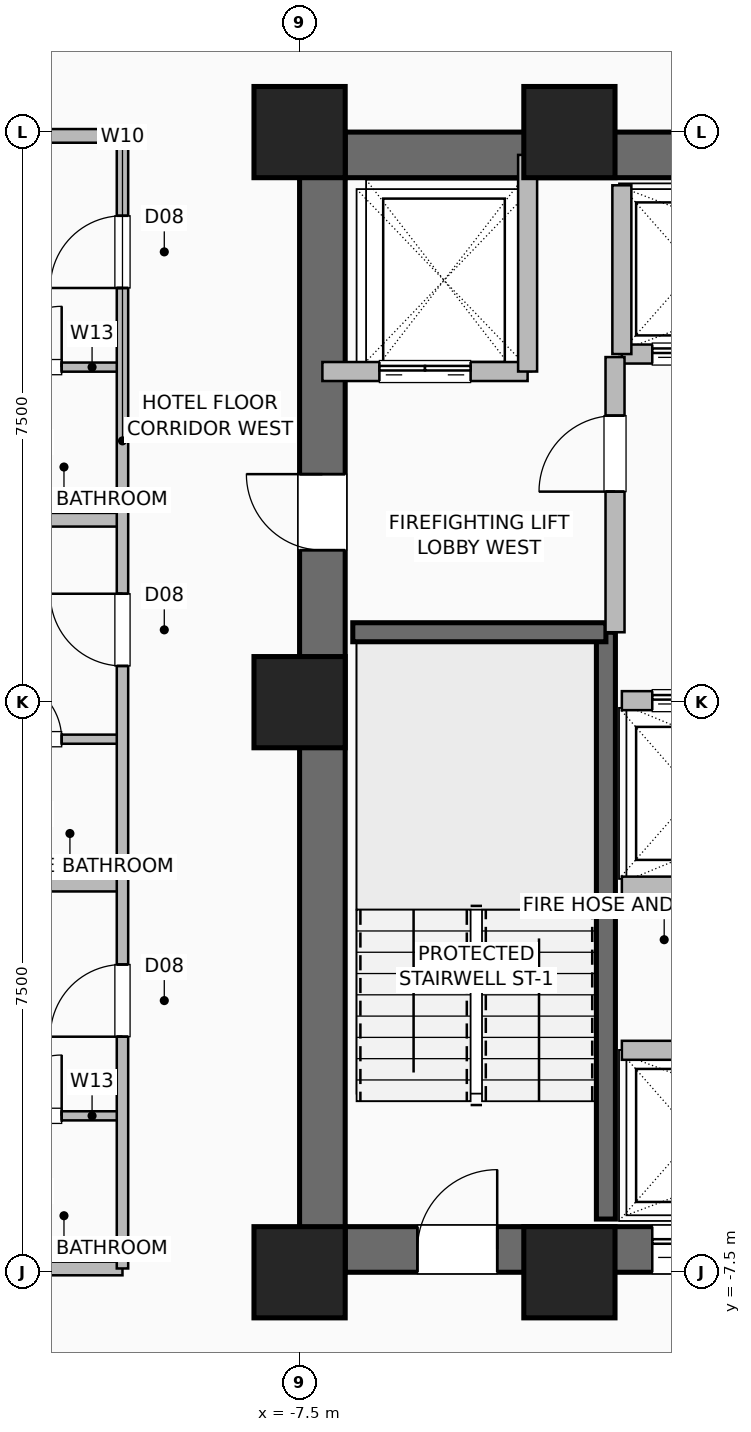
"""IFC4 building model, lengths in metres.
Left out: names, types, materials, properties, quantities, classifications, styles, units other than length and angle.
Written with IfcOpenShell. Run it as: python <this file> out.ifc"""

import sys

from ifc_helpers import new_model, si_unit, direction, frame, frame_2d, origin, origin_2d, place, context, subcontext, project, spatial, rectangle, hollow_rectangle, extrude, element, fill, save


model = new_model("IFC4")
c1 = context("Model", 3, precision=1e-05, world=origin(), true_north=direction((0.0, 1.0)))
c2 = subcontext(c1, "Body", "Model", "MODEL_VIEW")
j1 = project(units=[si_unit("LENGTHUNIT", "METRE"), si_unit("PLANEANGLEUNIT", "RADIAN")], contexts=[c1])
p1 = place(None, origin())
s1 = spatial("IfcSite", under=j1, at=p1, CompositionType="ELEMENT")
p2 = place(p1, origin())
s2 = spatial("IfcBuilding", under=s1, at=p2, CompositionType="ELEMENT")
p3 = place(p2, frame((0.0, 0.0, 55.0)))
s3 = spatial("IfcBuildingStorey", under=s2, at=p3, CompositionType="ELEMENT", Elevation=55.0)
for number, where, z_axis, x_axis in (
    (1, (-7.5, -7.5, 0.0), (0.0, 0.0, 1.0), (1.0, 0.0, 0.0)),
    (2, (-3.95, -7.5, 0.0), (0.0, 0.0, 1.0), (1.0, 0.0, 0.0)),
    (3, (-3.95, 7.5, 0.0), (0.0, 0.0, 1.0), (1.0, 0.0, 0.0)),
    (4, (-7.5, 7.5, 0.0), (0.0, 0.0, 1.0), (1.0, 0.0, 0.0)),
    (5, (-7.5, 0.0, 0.0), (0.0, 0.0, 1.0), (1.0, 0.0, 0.0)),
):
    element("IfcColumn", number, at=place(p3, frame(where, z_axis=z_axis, x_axis=x_axis)), inside=s3, PredefinedType="COLUMN", context=c2, shape_type="SweptSolid", body=[
        extrude(hollow_rectangle(XDim=1.2, YDim=1.2, WallThickness=0.055, at=origin_2d()), origin(), (0.0, 0.0, 1.0), 3.5),
    ])
p4 = place(p3, frame((-7.5, -7.2, 0.0), z_axis=(0.0, 0.0, 1.0), x_axis=(1.0, 0.0, 0.0)))
e6 = element("IfcWall", 6, at=p4, inside=s3, PredefinedType="SHEAR", context=c2, shape_type="SweptSolid", body=[
    extrude(rectangle(XDim=15.0, YDim=0.6, at=frame_2d((7.5, 0.0))), origin(), (0.0, 0.0, 1.0), 3.25),
])
p5 = place(p4, frame((1.55, 0.0, 0.0)))
e7 = element("IfcOpeningElement", 7, at=p5, cuts=e6, PredefinedType="OPENING", context=c2, shape_type="SweptSolid", body=[
    extrude(rectangle(XDim=1.05, YDim=2.08, at=frame_2d((0.525, 1.04))), frame((0.0, 0.31, 0.0), z_axis=(0.0, -1.0, 0.0), x_axis=(1.0, 0.0, 0.0)), (0.0, 0.0, 1.0), 0.62),
])
p6 = place(p4, frame((12.4, 0.0, 0.0)))
e8 = element("IfcOpeningElement", 8, at=p6, cuts=e6, PredefinedType="OPENING", context=c2, shape_type="SweptSolid", body=[
    extrude(rectangle(XDim=1.05, YDim=2.08, at=frame_2d((0.525, 1.04))), frame((0.0, 0.31, 0.0), z_axis=(0.0, -1.0, 0.0), x_axis=(1.0, 0.0, 0.0)), (0.0, 0.0, 1.0), 0.62),
])
p7 = place(p4, frame((4.64, 0.0, 0.0)))
e9 = element("IfcOpeningElement", 9, at=p7, cuts=e6, PredefinedType="OPENING", context=c2, shape_type="SweptSolid", body=[
    extrude(rectangle(XDim=1.1, YDim=2.2, at=frame_2d((0.55, 1.1))), frame((0.0, 0.31, 0.0), z_axis=(0.0, -1.0, 0.0), x_axis=(1.0, 0.0, 0.0)), (0.0, 0.0, 1.0), 0.62),
])
p8 = place(p4, frame((6.52, 0.0, 0.0)))
e10 = element("IfcOpeningElement", 10, at=p8, cuts=e6, PredefinedType="OPENING", context=c2, shape_type="SweptSolid", body=[
    extrude(rectangle(XDim=1.1, YDim=2.2, at=frame_2d((0.55, 1.1))), frame((0.0, 0.31, 0.0), z_axis=(0.0, -1.0, 0.0), x_axis=(1.0, 0.0, 0.0)), (0.0, 0.0, 1.0), 0.62),
])
p9 = place(p4, frame((8.4, 0.0, 0.0)))
e11 = element("IfcOpeningElement", 11, at=p9, cuts=e6, PredefinedType="OPENING", context=c2, shape_type="SweptSolid", body=[
    extrude(rectangle(XDim=1.1, YDim=2.2, at=frame_2d((0.55, 1.1))), frame((0.0, 0.31, 0.0), z_axis=(0.0, -1.0, 0.0), x_axis=(1.0, 0.0, 0.0)), (0.0, 0.0, 1.0), 0.62),
])
p10 = place(p3, frame((-7.5, 7.2, 0.0), z_axis=(0.0, 0.0, 1.0), x_axis=(1.0, 0.0, 0.0)))
e12 = element("IfcWall", 12, at=p10, inside=s3, PredefinedType="SHEAR", context=c2, shape_type="SweptSolid", body=[
    extrude(rectangle(XDim=15.0, YDim=0.6, at=frame_2d((7.5, 0.0))), origin(), (0.0, 0.0, 1.0), 3.25),
])
p11 = place(p3, frame((-7.2, -7.5, 0.0), z_axis=(0.0, 0.0, 1.0), x_axis=(0.0, 1.0, 0.0)))
e13 = element("IfcWall", 13, at=p11, inside=s3, PredefinedType="SHEAR", context=c2, shape_type="SweptSolid", body=[
    extrude(rectangle(XDim=15.0, YDim=0.6, at=frame_2d((7.5, 0.0))), origin(), (0.0, 0.0, 1.0), 3.25),
])
p12 = place(p11, frame((9.5, 0.0, 0.0)))
e14 = element("IfcOpeningElement", 14, at=p12, cuts=e13, PredefinedType="OPENING", context=c2, shape_type="SweptSolid", body=[
    extrude(rectangle(XDim=1.0, YDim=2.08, at=frame_2d((0.5, 1.04))), frame((0.0, 0.31, 0.0), z_axis=(0.0, -1.0, 0.0), x_axis=(1.0, 0.0, 0.0)), (0.0, 0.0, 1.0), 0.62),
])
p13 = place(p3, frame((-3.47, -6.8, 0.0), z_axis=(0.0, 0.0, 1.0), x_axis=(0.0, 1.0, 0.0)))
e15 = element("IfcWall", 15, at=p13, inside=s3, PredefinedType="SHEAR", context=c2, shape_type="SweptSolid", body=[
    extrude(rectangle(XDim=7.72, YDim=0.25, at=frame_2d((3.86, 0.0))), origin(), (0.0, 0.0, 1.0), 3.25),
])
p14 = place(p3, frame((-6.8, 0.92, 0.0), z_axis=(0.0, 0.0, 1.0), x_axis=(1.0, 0.0, 0.0)))
e16 = element("IfcWall", 16, at=p14, inside=s3, PredefinedType="SHEAR", context=c2, shape_type="SweptSolid", body=[
    extrude(rectangle(XDim=3.33, YDim=0.25, at=frame_2d((1.665, 0.0))), origin(), (0.0, 0.0, 1.0), 3.25),
])
p15 = place(p3, frame((-3.26, -4.58, 0.0), z_axis=(0.0, 0.0, 1.0), x_axis=(1.0, 0.0, 0.0)))
e17 = element("IfcWall", 17, at=p15, inside=s3, PredefinedType="SHEAR", context=c2, shape_type="SweptSolid", body=[
    extrude(rectangle(XDim=5.64, YDim=0.25, at=frame_2d((2.82, 0.0))), origin(), (0.0, 0.0, 1.0), 3.25),
])
p16 = place(p3, frame((-3.26, 0.02, 0.0), z_axis=(0.0, 0.0, 1.0), x_axis=(1.0, 0.0, 0.0)))
e18 = element("IfcWall", 18, at=p16, inside=s3, PredefinedType="SHEAR", context=c2, shape_type="SweptSolid", body=[
    extrude(rectangle(XDim=5.64, YDim=0.25, at=frame_2d((2.82, 0.0))), origin(), (0.0, 0.0, 1.0), 3.25),
])
p17 = place(p16, frame((0.4, 0.0, 0.0)))
e19 = element("IfcOpeningElement", 19, at=p17, cuts=e18, PredefinedType="OPENING", context=c2, shape_type="SweptSolid", body=[
    extrude(rectangle(XDim=1.1, YDim=2.2, at=frame_2d((0.55, 1.1))), frame((0.0, 0.135, 0.0), z_axis=(0.0, -1.0, 0.0), x_axis=(1.0, 0.0, 0.0)), (0.0, 0.0, 1.0), 0.27),
])
p18 = place(p16, frame((2.28, 0.0, 0.0)))
e20 = element("IfcOpeningElement", 20, at=p18, cuts=e18, PredefinedType="OPENING", context=c2, shape_type="SweptSolid", body=[
    extrude(rectangle(XDim=1.1, YDim=2.2, at=frame_2d((0.55, 1.1))), frame((0.0, 0.135, 0.0), z_axis=(0.0, -1.0, 0.0), x_axis=(1.0, 0.0, 0.0)), (0.0, 0.0, 1.0), 0.27),
])
p19 = place(p16, frame((4.16, 0.0, 0.0)))
e21 = element("IfcOpeningElement", 21, at=p19, cuts=e18, PredefinedType="OPENING", context=c2, shape_type="SweptSolid", body=[
    extrude(rectangle(XDim=1.1, YDim=2.2, at=frame_2d((0.55, 1.1))), frame((0.0, 0.135, 0.0), z_axis=(0.0, -1.0, 0.0), x_axis=(1.0, 0.0, 0.0)), (0.0, 0.0, 1.0), 0.27),
])
p20 = place(p3, frame((-3.26, -2.42, 0.0), z_axis=(0.0, 0.0, 1.0), x_axis=(1.0, 0.0, 0.0)))
e22 = element("IfcWall", 22, at=p20, inside=s3, PredefinedType="SHEAR", context=c2, shape_type="SweptSolid", body=[
    extrude(rectangle(XDim=5.64, YDim=0.25, at=frame_2d((2.82, 0.0))), origin(), (0.0, 0.0, 1.0), 3.25),
])
p21 = place(p3, frame((-3.26, 4.58, 0.0), z_axis=(0.0, 0.0, 1.0), x_axis=(1.0, 0.0, 0.0)))
e23 = element("IfcWall", 23, at=p21, inside=s3, PredefinedType="SHEAR", context=c2, shape_type="SweptSolid", body=[
    extrude(rectangle(XDim=5.64, YDim=0.25, at=frame_2d((2.82, 0.0))), origin(), (0.0, 0.0, 1.0), 3.25),
])
p22 = place(p21, frame((0.4, 0.0, 0.0)))
e24 = element("IfcOpeningElement", 24, at=p22, cuts=e23, PredefinedType="OPENING", context=c2, shape_type="SweptSolid", body=[
    extrude(rectangle(XDim=1.1, YDim=2.2, at=frame_2d((0.55, 1.1))), frame((0.0, 0.135, 0.0), z_axis=(0.0, -1.0, 0.0), x_axis=(1.0, 0.0, 0.0)), (0.0, 0.0, 1.0), 0.27),
])
p23 = place(p21, frame((2.28, 0.0, 0.0)))
e25 = element("IfcOpeningElement", 25, at=p23, cuts=e23, PredefinedType="OPENING", context=c2, shape_type="SweptSolid", body=[
    extrude(rectangle(XDim=1.1, YDim=2.2, at=frame_2d((0.55, 1.1))), frame((0.0, 0.135, 0.0), z_axis=(0.0, -1.0, 0.0), x_axis=(1.0, 0.0, 0.0)), (0.0, 0.0, 1.0), 0.27),
])
p24 = place(p21, frame((4.16, 0.0, 0.0)))
e26 = element("IfcOpeningElement", 26, at=p24, cuts=e23, PredefinedType="OPENING", context=c2, shape_type="SweptSolid", body=[
    extrude(rectangle(XDim=1.1, YDim=2.2, at=frame_2d((0.55, 1.1))), frame((0.0, 0.135, 0.0), z_axis=(0.0, -1.0, 0.0), x_axis=(1.0, 0.0, 0.0)), (0.0, 0.0, 1.0), 0.27),
])
p25 = place(p3, frame((-3.26, 4.58, 0.0), z_axis=(0.0, 0.0, 1.0), x_axis=(0.0, 1.0, 0.0)))
e27 = element("IfcWall", 27, at=p25, inside=s3, PredefinedType="SHEAR", context=c2, shape_type="SweptSolid", body=[
    extrude(rectangle(XDim=2.22, YDim=0.25, at=frame_2d((1.11, 0.0))), origin(), (0.0, 0.0, 1.0), 3.25),
])
p26 = place(p3, frame((-7.2, 4.35, 0.0), z_axis=(0.0, 0.0, 1.0), x_axis=(1.0, 0.0, 0.0)))
e28 = element("IfcWall", 28, at=p26, inside=s3, PredefinedType="SHEAR", context=c2, shape_type="SweptSolid", body=[
    extrude(rectangle(XDim=2.7, YDim=0.25, at=frame_2d((1.35, 0.0))), origin(), (0.0, 0.0, 1.0), 3.25),
])
p27 = place(p26, frame((0.75, 0.0, 0.0)))
e29 = element("IfcOpeningElement", 29, at=p27, cuts=e28, PredefinedType="OPENING", context=c2, shape_type="SweptSolid", body=[
    extrude(rectangle(XDim=1.2, YDim=2.2, at=frame_2d((0.6, 1.1))), frame((0.0, 0.135, 0.0), z_axis=(0.0, -1.0, 0.0), x_axis=(1.0, 0.0, 0.0)), (0.0, 0.0, 1.0), 0.27),
])
p28 = place(p3, frame((-4.5, 4.35, 0.0), z_axis=(0.0, 0.0, 1.0), x_axis=(0.0, 1.0, 0.0)))
e30 = element("IfcWall", 30, at=p28, inside=s3, PredefinedType="SHEAR", context=c2, shape_type="SweptSolid", body=[
    extrude(rectangle(XDim=2.85, YDim=0.25, at=frame_2d((1.425, 0.0))), origin(), (0.0, 0.0, 1.0), 3.25),
])
p29 = place(p3, frame((-3.35, 0.92, 0.0), z_axis=(0.0, 0.0, 1.0), x_axis=(0.0, 1.0, 0.0)))
e31 = element("IfcWall", 31, at=p29, inside=s3, PredefinedType="SHEAR", context=c2, shape_type="SweptSolid", body=[
    extrude(rectangle(XDim=3.62, YDim=0.25, at=frame_2d((1.81, 0.0))), origin(), (0.0, 0.0, 1.0), 3.25),
])
p30 = place(p29, frame((1.85, 0.0, 0.0)))
e32 = element("IfcOpeningElement", 32, at=p30, cuts=e31, PredefinedType="OPENING", context=c2, shape_type="SweptSolid", body=[
    extrude(rectangle(XDim=1.0, YDim=2.08, at=frame_2d((0.5, 1.04))), frame((0.0, 0.135, 0.0), z_axis=(0.0, -1.0, 0.0), x_axis=(1.0, 0.0, 0.0)), (0.0, 0.0, 1.0), 0.27),
])
p31 = place(p3, frame((-12.08, -5.442, 0.0), z_axis=(0.0, 0.0, 1.0), x_axis=(1.0, 0.0, 0.0)))
e33 = element("IfcWall", 33, at=p31, inside=s3, PredefinedType="PLUMBINGWALL", context=c2, shape_type="SweptSolid", body=[
    extrude(rectangle(XDim=2.25, YDim=0.12, at=frame_2d((1.125, 0.0))), origin(), (0.0, 0.0, 1.0), 3.25),
])
p32 = place(p31, frame((0.65, 0.0, 0.0)))
e34 = element("IfcOpeningElement", 34, at=p32, cuts=e33, PredefinedType="OPENING", context=c2, shape_type="SweptSolid", body=[
    extrude(rectangle(XDim=0.8, YDim=2.05, at=frame_2d((0.4, 1.025))), frame((0.0, 0.07, 0.0), z_axis=(0.0, -1.0, 0.0), x_axis=(1.0, 0.0, 0.0)), (0.0, 0.0, 1.0), 0.14),
])
p33 = place(p3, frame((-12.08, -0.487, 0.0), z_axis=(0.0, 0.0, 1.0), x_axis=(1.0, 0.0, 0.0)))
e35 = element("IfcWall", 35, at=p33, inside=s3, PredefinedType="PLUMBINGWALL", context=c2, shape_type="SweptSolid", body=[
    extrude(rectangle(XDim=2.25, YDim=0.12, at=frame_2d((1.125, 0.0))), origin(), (0.0, 0.0, 1.0), 3.25),
])
p34 = place(p33, frame((0.65, 0.0, 0.0)))
e36 = element("IfcOpeningElement", 36, at=p34, cuts=e35, PredefinedType="OPENING", context=c2, shape_type="SweptSolid", body=[
    extrude(rectangle(XDim=0.8, YDim=2.05, at=frame_2d((0.4, 1.025))), frame((0.0, 0.07, 0.0), z_axis=(0.0, -1.0, 0.0), x_axis=(1.0, 0.0, 0.0)), (0.0, 0.0, 1.0), 0.14),
])
p35 = place(p3, frame((-12.08, 4.408, 0.0), z_axis=(0.0, 0.0, 1.0), x_axis=(1.0, 0.0, 0.0)))
e37 = element("IfcWall", 37, at=p35, inside=s3, PredefinedType="PLUMBINGWALL", context=c2, shape_type="SweptSolid", body=[
    extrude(rectangle(XDim=2.25, YDim=0.12, at=frame_2d((1.125, 0.0))), origin(), (0.0, 0.0, 1.0), 3.25),
])
p36 = place(p35, frame((0.65, 0.0, 0.0)))
e38 = element("IfcOpeningElement", 38, at=p36, cuts=e37, PredefinedType="OPENING", context=c2, shape_type="SweptSolid", body=[
    extrude(rectangle(XDim=0.8, YDim=2.05, at=frame_2d((0.4, 1.025))), frame((0.0, 0.07, 0.0), z_axis=(0.0, -1.0, 0.0), x_axis=(1.0, 0.0, 0.0)), (0.0, 0.0, 1.0), 0.14),
])
for number, where, z_axis, x_axis in (
    (39, (-23.82, -7.45, 0.0), (0.0, 0.0, 1.0), (1.0, 0.0, 0.0)),
    (40, (-23.82, -2.4, 0.0), (0.0, 0.0, 1.0), (1.0, 0.0, 0.0)),
    (41, (-23.82, 2.4, 0.0), (0.0, 0.0, 1.0), (1.0, 0.0, 0.0)),
    (42, (-23.82, 7.45, 0.0), (0.0, 0.0, 1.0), (1.0, 0.0, 0.0)),
):
    element("IfcWall", number, at=place(p3, frame(where, z_axis=z_axis, x_axis=x_axis)), inside=s3, PredefinedType="PARTITIONING", context=c2, shape_type="SweptSolid", body=[
        extrude(rectangle(XDim=13.99, YDim=0.18, at=frame_2d((6.995, 0.0))), origin(), (0.0, 0.0, 1.0), 3.25),
    ])
p37 = place(p3, frame((-9.83, -7.45, 0.0), z_axis=(0.0, 0.0, 1.0), x_axis=(0.0, 1.0, 0.0)))
e43 = element("IfcWall", 43, at=p37, inside=s3, PredefinedType="PARTITIONING", context=c2, shape_type="SweptSolid", body=[
    extrude(rectangle(XDim=14.9, YDim=0.15, at=frame_2d((7.45, 0.0))), origin(), (0.0, 0.0, 1.0), 3.25),
])
p38 = place(p37, frame((3.049, 0.0, 0.0)))
e44 = element("IfcOpeningElement", 44, at=p38, cuts=e43, PredefinedType="OPENING", context=c2, shape_type="SweptSolid", body=[
    extrude(rectangle(XDim=0.95, YDim=2.08, at=frame_2d((0.475, 1.04))), frame((0.0, 0.085, 0.0), z_axis=(0.0, -1.0, 0.0), x_axis=(1.0, 0.0, 0.0)), (0.0, 0.0, 1.0), 0.17),
])
p39 = place(p37, frame((7.927, 0.0, 0.0)))
e45 = element("IfcOpeningElement", 45, at=p39, cuts=e43, PredefinedType="OPENING", context=c2, shape_type="SweptSolid", body=[
    extrude(rectangle(XDim=0.95, YDim=2.08, at=frame_2d((0.475, 1.04))), frame((0.0, 0.085, 0.0), z_axis=(0.0, -1.0, 0.0), x_axis=(1.0, 0.0, 0.0)), (0.0, 0.0, 1.0), 0.17),
])
p40 = place(p37, frame((12.899, 0.0, 0.0)))
e46 = element("IfcOpeningElement", 46, at=p40, cuts=e43, PredefinedType="OPENING", context=c2, shape_type="SweptSolid", body=[
    extrude(rectangle(XDim=0.95, YDim=2.08, at=frame_2d((0.475, 1.04))), frame((0.0, 0.085, 0.0), z_axis=(0.0, -1.0, 0.0), x_axis=(1.0, 0.0, 0.0)), (0.0, 0.0, 1.0), 0.17),
])
p41 = place(p5, origin())
e47 = element("IfcDoor", 47, at=p41, inside=s3, OperationType="SINGLE_SWING_RIGHT", PredefinedType="DOOR", context=c2, shape_type="SweptSolid", body=[
    extrude(rectangle(XDim=1.05, YDim=2.08, at=frame_2d((0.525, 1.04))), frame((0.0, 0.025, 0.0), z_axis=(0.0, -1.0, 0.0), x_axis=(1.0, 0.0, 0.0)), (0.0, 0.0, 1.0), 0.05),
])
fill(e7, e47)
p42 = place(p12, origin())
e48 = element("IfcDoor", 48, at=p42, inside=s3, OperationType="SINGLE_SWING_RIGHT", PredefinedType="DOOR", context=c2, shape_type="SweptSolid", body=[
    extrude(rectangle(XDim=1.0, YDim=2.08, at=frame_2d((0.5, 1.04))), frame((0.0, 0.025, 0.0), z_axis=(0.0, -1.0, 0.0), x_axis=(1.0, 0.0, 0.0)), (0.0, 0.0, 1.0), 0.05),
])
fill(e14, e48)
p43 = place(p7, origin())
e49 = element("IfcDoor", 49, at=p43, inside=s3, OperationType="DOUBLE_DOOR_SLIDING", PredefinedType="DOOR", context=c2, shape_type="SweptSolid", body=[
    extrude(rectangle(XDim=1.1, YDim=2.2, at=frame_2d((0.55, 1.1))), frame((0.0, 0.025, 0.0), z_axis=(0.0, -1.0, 0.0), x_axis=(1.0, 0.0, 0.0)), (0.0, 0.0, 1.0), 0.05),
])
fill(e9, e49)
p44 = place(p17, origin())
e50 = element("IfcDoor", 50, at=p44, inside=s3, OperationType="DOUBLE_DOOR_SLIDING", PredefinedType="DOOR", context=c2, shape_type="SweptSolid", body=[
    extrude(rectangle(XDim=1.1, YDim=2.2, at=frame_2d((0.55, 1.1))), frame((0.0, 0.025, 0.0), z_axis=(0.0, -1.0, 0.0), x_axis=(1.0, 0.0, 0.0)), (0.0, 0.0, 1.0), 0.05),
])
fill(e19, e50)
p45 = place(p22, origin())
e51 = element("IfcDoor", 51, at=p45, inside=s3, OperationType="DOUBLE_DOOR_SLIDING", PredefinedType="DOOR", context=c2, shape_type="SweptSolid", body=[
    extrude(rectangle(XDim=1.1, YDim=2.2, at=frame_2d((0.55, 1.1))), frame((0.0, 0.025, 0.0), z_axis=(0.0, -1.0, 0.0), x_axis=(1.0, 0.0, 0.0)), (0.0, 0.0, 1.0), 0.05),
])
fill(e24, e51)
p46 = place(p27, origin())
e52 = element("IfcDoor", 52, at=p46, inside=s3, OperationType="DOUBLE_DOOR_SLIDING", PredefinedType="DOOR", context=c2, shape_type="SweptSolid", body=[
    extrude(rectangle(XDim=1.2, YDim=2.2, at=frame_2d((0.6, 1.1))), frame((0.0, 0.025, 0.0), z_axis=(0.0, -1.0, 0.0), x_axis=(1.0, 0.0, 0.0)), (0.0, 0.0, 1.0), 0.05),
])
fill(e29, e52)
p47 = place(p30, origin())
e53 = element("IfcDoor", 53, at=p47, inside=s3, OperationType="SINGLE_SWING_LEFT", PredefinedType="DOOR", context=c2, shape_type="SweptSolid", body=[
    extrude(rectangle(XDim=1.0, YDim=2.08, at=frame_2d((0.5, 1.04))), frame((0.0, 0.025, 0.0), z_axis=(0.0, -1.0, 0.0), x_axis=(1.0, 0.0, 0.0)), (0.0, 0.0, 1.0), 0.05),
])
fill(e32, e53)
p48 = place(p32, origin())
e54 = element("IfcDoor", 54, at=p48, inside=s3, OperationType="SINGLE_SWING_RIGHT", PredefinedType="DOOR", context=c2, shape_type="SweptSolid", body=[
    extrude(rectangle(XDim=0.8, YDim=2.05, at=frame_2d((0.4, 1.025))), frame((0.0, 0.025, 0.0), z_axis=(0.0, -1.0, 0.0), x_axis=(1.0, 0.0, 0.0)), (0.0, 0.0, 1.0), 0.05),
])
fill(e34, e54)
p49 = place(p34, origin())
e55 = element("IfcDoor", 55, at=p49, inside=s3, OperationType="SINGLE_SWING_LEFT", PredefinedType="DOOR", context=c2, shape_type="SweptSolid", body=[
    extrude(rectangle(XDim=0.8, YDim=2.05, at=frame_2d((0.4, 1.025))), frame((0.0, 0.025, 0.0), z_axis=(0.0, -1.0, 0.0), x_axis=(1.0, 0.0, 0.0)), (0.0, 0.0, 1.0), 0.05),
])
fill(e36, e55)
p50 = place(p36, origin())
e56 = element("IfcDoor", 56, at=p50, inside=s3, OperationType="SINGLE_SWING_RIGHT", PredefinedType="DOOR", context=c2, shape_type="SweptSolid", body=[
    extrude(rectangle(XDim=0.8, YDim=2.05, at=frame_2d((0.4, 1.025))), frame((0.0, 0.025, 0.0), z_axis=(0.0, -1.0, 0.0), x_axis=(1.0, 0.0, 0.0)), (0.0, 0.0, 1.0), 0.05),
])
fill(e38, e56)
p51 = place(p38, origin())
e57 = element("IfcDoor", 57, at=p51, inside=s3, OperationType="SINGLE_SWING_LEFT", PredefinedType="DOOR", context=c2, shape_type="SweptSolid", body=[
    extrude(rectangle(XDim=0.95, YDim=2.08, at=frame_2d((0.475, 1.04))), frame((0.0, 0.025, 0.0), z_axis=(0.0, -1.0, 0.0), x_axis=(1.0, 0.0, 0.0)), (0.0, 0.0, 1.0), 0.05),
])
fill(e44, e57)
p52 = place(p39, origin())
e58 = element("IfcDoor", 58, at=p52, inside=s3, OperationType="SINGLE_SWING_RIGHT", PredefinedType="DOOR", context=c2, shape_type="SweptSolid", body=[
    extrude(rectangle(XDim=0.95, YDim=2.08, at=frame_2d((0.475, 1.04))), frame((0.0, 0.025, 0.0), z_axis=(0.0, -1.0, 0.0), x_axis=(1.0, 0.0, 0.0)), (0.0, 0.0, 1.0), 0.05),
])
fill(e45, e58)
p53 = place(p40, origin())
e59 = element("IfcDoor", 59, at=p53, inside=s3, OperationType="SINGLE_SWING_LEFT", PredefinedType="DOOR", context=c2, shape_type="SweptSolid", body=[
    extrude(rectangle(XDim=0.95, YDim=2.08, at=frame_2d((0.475, 1.04))), frame((0.0, 0.025, 0.0), z_axis=(0.0, -1.0, 0.0), x_axis=(1.0, 0.0, 0.0)), (0.0, 0.0, 1.0), 0.05),
])
fill(e46, e59)
save(model, sys.argv[1])
